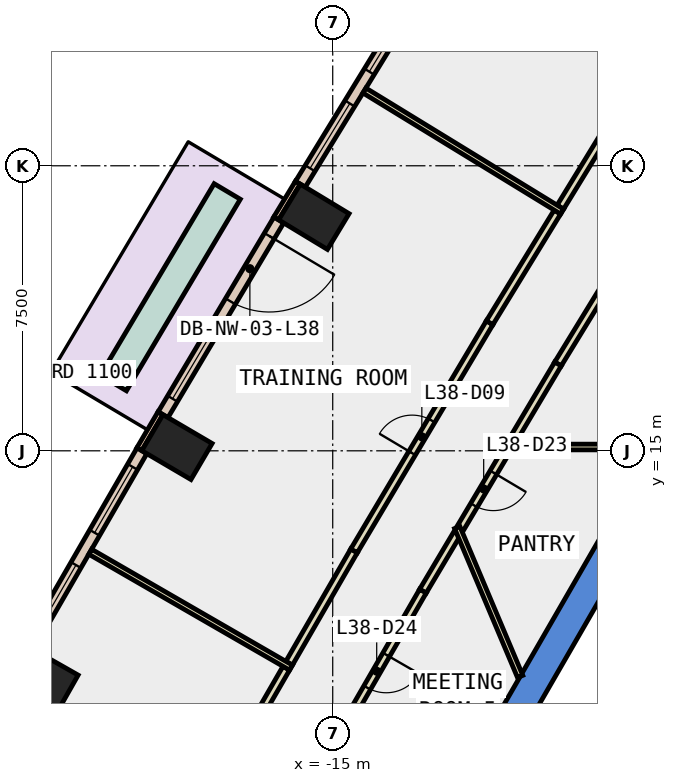
"""IFC4 building model, lengths in metres.
Left out: names, types, materials, properties, quantities, classifications, styles, units other than length and angle.
Written with IfcOpenShell. Run it as: python <this file> out.ifc"""

import sys

from ifc_helpers import new_model, si_unit, direction, frame, frame_2d, origin, origin_2d, place, context, subcontext, project, spatial, polyline, rectangle, outline, extrude, element, fill, save


model = new_model("IFC4")
c1 = context("Model", 3, precision=1e-05, world=origin(), true_north=direction((0.0, 1.0)))
c2 = subcontext(c1, "Body", "Model", "MODEL_VIEW")
j1 = project(units=[si_unit("LENGTHUNIT", "METRE"), si_unit("PLANEANGLEUNIT", "RADIAN")], contexts=[c1])
p1 = place(None, origin())
s1 = spatial("IfcSite", under=j1, at=p1, CompositionType="ELEMENT")
p2 = place(p1, origin())
s2 = spatial("IfcBuilding", under=s1, at=p2, CompositionType="ELEMENT")
p3 = place(p2, frame((0.0, 0.0, 171.8)))
s3 = spatial("IfcBuildingStorey", under=s2, at=p3, CompositionType="ELEMENT", Elevation=171.8)
for number, where, z_axis, x_axis in (
    (1, (-15.496, 21.158, -0.4), (0.0, 0.0, 1.0), (0.518, 0.855, 0.0)),
    (2, (-19.099, 15.098, -0.4), (0.0, 0.0, 1.0), (0.506, 0.863, 0.0)),
    (3, (-22.623, 8.991, -0.4), (0.0, 0.0, 1.0), (0.494, 0.869, 0.0)),
):
    element("IfcColumn", number, at=place(p3, frame(where, z_axis=z_axis, x_axis=x_axis)), inside=s3, PredefinedType="COLUMN", context=c2, shape_type="SweptSolid", body=[
        extrude(rectangle(XDim=1.1, YDim=1.5, at=origin_2d()), origin(), (0.0, 0.0, 1.0), 4.2),
    ])
p4 = place(p3, frame((0.0, 0.0, -0.4)))
e4 = element("IfcWall", 4, at=p4, inside=s3, PredefinedType="SHEAR", context=c2, shape_type="SweptSolid", body=[
    extrude(outline(polyline([(-12.267, 5.252), (-11.575, 4.852), (-6.466, 13.7), (-6.928, 14.5), (-12.267, 5.252)])), origin(), (0.0, 0.0, 1.0), 4.2),
])
p5 = place(p3, frame((-15.917, 22.056, 0.0), z_axis=(0.0, 0.0, 1.0), x_axis=(-0.518178754102, -0.855272341888, 0.0)))
e5 = element("IfcWall", 5, at=p5, inside=s3, PredefinedType="STANDARD", context=c2, shape_type="SweptSolid", body=[
    extrude(rectangle(XDim=1.1, YDim=0.15, at=frame_2d((0.55, 0.0))), origin(), (0.0, 0.0, 1.0), 3.8),
])
p6 = place(p3, frame((-19.532, 15.989, 0.0), z_axis=(0.0, 0.0, 1.0), x_axis=(-0.50667077411, -0.862139621327, 0.0)))
e6 = element("IfcWall", 6, at=p6, inside=s3, PredefinedType="STANDARD", context=c2, shape_type="SweptSolid", body=[
    extrude(rectangle(XDim=1.1, YDim=0.15, at=frame_2d((0.55, 0.0))), origin(), (0.0, 0.0, 1.0), 3.8),
])
p7 = place(p3, frame((-12.737, 27.101, 0.0), z_axis=(0.0, 0.0, 1.0), x_axis=(-0.522156898008, -0.852849443842, 0.0)))
e7 = element("IfcWall", 7, at=p7, inside=s3, PredefinedType="STANDARD", context=c2, shape_type="SweptSolid", body=[
    extrude(rectangle(XDim=5.964, YDim=0.3, at=frame_2d((2.982, 0.0))), origin(), (0.0, 0.0, 1.0), 3.8),
])
p8 = place(p7, frame((0.491, 0.0, 0.9)))
e8 = element("IfcOpeningElement", 8, at=p8, cuts=e7, PredefinedType="OPENING", context=c2, shape_type="SweptSolid", body=[
    extrude(rectangle(XDim=2.0, YDim=2.6, at=frame_2d((1.0, 1.3))), frame((0.0, 0.16, 0.0), z_axis=(0.0, -1.0, 0.0), x_axis=(1.0, 0.0, 0.0)), (0.0, 0.0, 1.0), 0.32),
])
p9 = place(p7, frame((3.473, 0.0, 0.9)))
e9 = element("IfcOpeningElement", 9, at=p9, cuts=e7, PredefinedType="OPENING", context=c2, shape_type="SweptSolid", body=[
    extrude(rectangle(XDim=2.0, YDim=2.6, at=frame_2d((1.0, 1.3))), frame((0.0, 0.16, 0.0), z_axis=(0.0, -1.0, 0.0), x_axis=(1.0, 0.0, 0.0)), (0.0, 0.0, 1.0), 0.32),
])
p10 = place(p3, frame((-16.418, 21.074, 0.0), z_axis=(0.0, 0.0, 1.0), x_axis=(-0.511053317394, -0.8595490136, 0.0)))
e10 = element("IfcWall", 10, at=p10, inside=s3, PredefinedType="STANDARD", context=c2, shape_type="SweptSolid", body=[
    extrude(rectangle(XDim=5.962, YDim=0.3, at=frame_2d((2.981, 0.0))), origin(), (0.0, 0.0, 1.0), 3.8),
])
p11 = place(p10, frame((0.491, 0.0, 0.0)))
e11 = element("IfcOpeningElement", 11, at=p11, cuts=e10, PredefinedType="OPENING", context=c2, shape_type="SweptSolid", body=[
    extrude(rectangle(XDim=2.0, YDim=2.4, at=frame_2d((1.0, 1.2))), frame((0.0, 0.16, 0.0), z_axis=(0.0, -1.0, 0.0), x_axis=(1.0, 0.0, 0.0)), (0.0, 0.0, 1.0), 0.32),
])
p12 = place(p10, frame((3.472, 0.0, 0.9)))
e12 = element("IfcOpeningElement", 12, at=p12, cuts=e10, PredefinedType="OPENING", context=c2, shape_type="SweptSolid", body=[
    extrude(rectangle(XDim=2.0, YDim=2.6, at=frame_2d((1.0, 1.3))), frame((0.0, 0.16, 0.0), z_axis=(0.0, -1.0, 0.0), x_axis=(1.0, 0.0, 0.0)), (0.0, 0.0, 1.0), 0.32),
])
p13 = place(p3, frame((-20.02, 15.002, 0.0), z_axis=(0.0, 0.0, 1.0), x_axis=(-0.49986421087, -0.866103787482, 0.0)))
e13 = element("IfcWall", 13, at=p13, inside=s3, PredefinedType="STANDARD", context=c2, shape_type="SweptSolid", body=[
    extrude(rectangle(XDim=5.964, YDim=0.3, at=frame_2d((2.982, 0.0))), origin(), (0.0, 0.0, 1.0), 3.8),
])
p14 = place(p13, frame((0.491, 0.0, 0.9)))
e14 = element("IfcOpeningElement", 14, at=p14, cuts=e13, PredefinedType="OPENING", context=c2, shape_type="SweptSolid", body=[
    extrude(rectangle(XDim=2.0, YDim=2.6, at=frame_2d((1.0, 1.3))), frame((0.0, 0.16, 0.0), z_axis=(0.0, -1.0, 0.0), x_axis=(1.0, 0.0, 0.0)), (0.0, 0.0, 1.0), 0.32),
])
p15 = place(p13, frame((3.473, 0.0, 0.9)))
e15 = element("IfcOpeningElement", 15, at=p15, cuts=e13, PredefinedType="OPENING", context=c2, shape_type="SweptSolid", body=[
    extrude(rectangle(XDim=2.0, YDim=2.6, at=frame_2d((1.0, 1.3))), frame((0.0, 0.16, 0.0), z_axis=(0.0, -1.0, 0.0), x_axis=(1.0, 0.0, 0.0)), (0.0, 0.0, 1.0), 0.32),
])
p16 = place(p3, frame((-17.776, 21.824, 0.0), z_axis=(0.0, 0.0, 1.0), x_axis=(-0.510988922218, -0.85958729712, 0.0)))
e16 = element("IfcWall", 16, at=p16, inside=s3, PredefinedType="STANDARD", context=c2, shape_type="SweptSolid", body=[
    extrude(rectangle(XDim=5.863, YDim=0.8, at=frame_2d((2.932, 0.0))), origin(), (0.0, 0.0, 1.0), 0.8),
])
p17 = place(p3, frame((-10.41, 15.036, 0.0), z_axis=(0.0, 0.0, 1.0), x_axis=(-0.510900085603, -0.859640100583, 0.0)))
e17 = element("IfcWall", 17, at=p17, inside=s3, PredefinedType="PARTITIONING", context=c2, shape_type="SweptSolid", body=[
    extrude(rectangle(XDim=2.419, YDim=0.2, at=frame_2d((1.21, 0.0))), origin(), (0.0, 0.0, 1.0), 3.8),
])
p18 = place(p17, frame((0.709, 0.0, 0.0)))
e18 = element("IfcOpeningElement", 18, at=p18, cuts=e17, PredefinedType="OPENING", context=c2, shape_type="SweptSolid", body=[
    extrude(rectangle(XDim=1.0, YDim=2.1, at=frame_2d((0.5, 1.05))), frame((0.0, 0.11, 0.0), z_axis=(0.0, -1.0, 0.0), x_axis=(1.0, 0.0, 0.0)), (0.0, 0.0, 1.0), 0.22),
])
p19 = place(p3, frame((-11.723, 12.827, 0.0), z_axis=(0.0, 0.0, 1.0), x_axis=(-0.511182890129, -0.859471961637, 0.0)))
e19 = element("IfcWall", 19, at=p19, inside=s3, PredefinedType="PARTITIONING", context=c2, shape_type="SweptSolid", body=[
    extrude(rectangle(XDim=1.769, YDim=0.2, at=frame_2d((0.884, 0.0))), origin(), (0.0, 0.0, 1.0), 3.8),
])
p20 = place(p3, frame((-12.627, 11.307, 0.0), z_axis=(0.0, 0.0, 1.0), x_axis=(-0.499907870494, -0.866078588246, 0.0)))
e20 = element("IfcWall", 20, at=p20, inside=s3, PredefinedType="PARTITIONING", context=c2, shape_type="SweptSolid", body=[
    extrude(rectangle(XDim=4.863, YDim=0.2, at=frame_2d((2.432, 0.0))), origin(), (0.0, 0.0, 1.0), 3.8),
])
p21 = place(p20, frame((1.932, 0.0, 0.0)))
e21 = element("IfcOpeningElement", 21, at=p21, cuts=e20, PredefinedType="OPENING", context=c2, shape_type="SweptSolid", body=[
    extrude(rectangle(XDim=1.0, YDim=2.1, at=frame_2d((0.5, 1.05))), frame((0.0, 0.11, 0.0), z_axis=(0.0, -1.0, 0.0), x_axis=(1.0, 0.0, 0.0)), (0.0, 0.0, 1.0), 0.22),
])
p22 = place(p3, frame((-5.441, 23.218, 0.0), z_axis=(0.0, 0.0, 1.0), x_axis=(-0.522108536257, -0.85287905143, 0.0)))
e22 = element("IfcWall", 22, at=p22, inside=s3, PredefinedType="PARTITIONING", context=c2, shape_type="SweptSolid", body=[
    extrude(rectangle(XDim=6.957, YDim=0.2, at=frame_2d((3.478, 0.0))), origin(), (0.0, 0.0, 1.0), 3.8),
])
p23 = place(p3, frame((-9.073, 17.285, 0.0), z_axis=(0.0, 0.0, 1.0), x_axis=(-0.51105761127, -0.859546460619, 0.0)))
e23 = element("IfcWall", 23, at=p23, inside=s3, PredefinedType="PARTITIONING", context=c2, shape_type="SweptSolid", body=[
    extrude(rectangle(XDim=2.467, YDim=0.2, at=frame_2d((1.234, 0.0))), origin(), (0.0, 0.0, 1.0), 3.8),
])
p24 = place(p3, frame((-9.01, 21.411, 0.0), z_axis=(0.0, 0.0, 1.0), x_axis=(0.52198736623, 0.852953216476, 0.0)))
e24 = element("IfcWall", 24, at=p24, inside=s3, PredefinedType="PARTITIONING", context=c2, shape_type="SweptSolid", body=[
    extrude(rectangle(XDim=3.417, YDim=0.2, at=frame_2d((1.709, 0.0))), origin(), (0.0, 0.0, 1.0), 3.8),
])
p25 = place(p3, frame((-16.147, 9.41, 0.0), z_axis=(0.0, 0.0, 1.0), x_axis=(0.500044178772, 0.865999895656, 0.0)))
e25 = element("IfcWall", 25, at=p25, inside=s3, PredefinedType="PARTITIONING", context=c2, shape_type="SweptSolid", body=[
    extrude(rectangle(XDim=3.416, YDim=0.2, at=frame_2d((1.708, 0.0))), origin(), (0.0, 0.0, 1.0), 3.8),
])
p26 = place(p3, frame((-14.439, 12.368, 0.0), z_axis=(0.0, 0.0, 1.0), x_axis=(0.51096926939, 0.859598979606, 0.0)))
e26 = element("IfcWall", 26, at=p26, inside=s3, PredefinedType="PARTITIONING", context=c2, shape_type="SweptSolid", body=[
    extrude(rectangle(XDim=6.983, YDim=0.2, at=frame_2d((3.491, 0.0))), origin(), (0.0, 0.0, 1.0), 3.8),
])
p27 = place(p26, frame((2.991, 0.0, 0.0)))
e27 = element("IfcOpeningElement", 27, at=p27, cuts=e26, PredefinedType="OPENING", context=c2, shape_type="SweptSolid", body=[
    extrude(rectangle(XDim=1.0, YDim=2.1, at=frame_2d((0.5, 1.05))), frame((0.0, 0.11, 0.0), z_axis=(0.0, -1.0, 0.0), x_axis=(1.0, 0.0, 0.0)), (0.0, 0.0, 1.0), 0.22),
])
p28 = place(p3, frame((-10.871, 18.37, 0.0), z_axis=(0.0, 0.0, 1.0), x_axis=(0.522117781608, 0.852873391617, 0.0)))
e28 = element("IfcWall", 28, at=p28, inside=s3, PredefinedType="PARTITIONING", context=c2, shape_type="SweptSolid", body=[
    extrude(rectangle(XDim=3.415, YDim=0.2, at=frame_2d((1.708, 0.0))), origin(), (0.0, 0.0, 1.0), 3.8),
])
p29 = place(p3, frame((-17.93, 6.321, 0.0), z_axis=(0.0, 0.0, 1.0), x_axis=(0.499920397431, 0.866071357471, 0.0)))
e29 = element("IfcWall", 29, at=p29, inside=s3, PredefinedType="PARTITIONING", context=c2, shape_type="SweptSolid", body=[
    extrude(rectangle(XDim=3.417, YDim=0.2, at=frame_2d((1.708, 0.0))), origin(), (0.0, 0.0, 1.0), 3.8),
])
p30 = place(p3, frame((-10.068, 9.062, 0.0), z_axis=(0.0, 0.0, 1.0), x_axis=(-0.388992587102, 0.921240884448, 0.0)))
e30 = element("IfcWall", 30, at=p30, inside=s3, PredefinedType="PARTITIONING", context=c2, shape_type="SweptSolid", body=[
    extrude(rectangle(XDim=4.257, YDim=0.15, at=frame_2d((2.128, 0.0))), origin(), (0.0, 0.0, 1.0), 3.8),
])
p31 = place(p3, frame((-6.82, 15.1, 0.0), z_axis=(0.0, 0.0, 1.0), x_axis=(-1.0, 0.0, 0.0)))
e31 = element("IfcWall", 31, at=p31, inside=s3, PredefinedType="PARTITIONING", context=c2, shape_type="SweptSolid", body=[
    extrude(rectangle(XDim=3.652, YDim=0.15, at=frame_2d((1.826, 0.0))), origin(), (0.0, 0.0, 1.0), 3.8),
])
p32 = place(p3, frame((-8.964, 21.295, 0.0), z_axis=(0.0, 0.0, 1.0), x_axis=(-0.852835298101, 0.522180001832, 0.0)))
e32 = element("IfcWall", 32, at=p32, inside=s3, PredefinedType="PARTITIONING", context=c2, shape_type="SweptSolid", body=[
    extrude(rectangle(XDim=6.1, YDim=0.15, at=frame_2d((3.05, 0.0))), origin(), (0.0, 0.0, 1.0), 3.8),
])
p33 = place(p3, frame((-16.098, 9.295, 0.0), z_axis=(0.0, 0.0, 1.0), x_axis=(-0.866109615698, 0.499854112313, 0.0)))
e33 = element("IfcWall", 33, at=p33, inside=s3, PredefinedType="PARTITIONING", context=c2, shape_type="SweptSolid", body=[
    extrude(rectangle(XDim=6.1, YDim=0.15, at=frame_2d((3.05, 0.0))), origin(), (0.0, 0.0, 1.0), 3.8),
])
p34 = place(p3, frame((-5.03, 9.388, 0.0), z_axis=(0.0, 0.0, 1.0), x_axis=(-0.499978703459, -0.866037698999, 0.0)))
e34 = element("IfcWall", 34, at=p34, inside=s3, PredefinedType="STANDARD", context=c2, shape_type="SweptSolid", body=[
    extrude(rectangle(XDim=6.9, YDim=0.2, at=frame_2d((3.45, 0.0))), origin(), (0.0, 0.0, 1.0), 3.8),
])
p35 = place(p8, origin())
e35 = element("IfcWindow", 35, at=p35, inside=s3, PartitioningType="SINGLE_PANEL", PredefinedType="WINDOW", context=c2, shape_type="SweptSolid", body=[
    extrude(rectangle(XDim=2.0, YDim=2.6, at=frame_2d((1.0, 1.3))), frame((0.0, 0.03, 0.0), z_axis=(0.0, -1.0, 0.0), x_axis=(1.0, 0.0, 0.0)), (0.0, 0.0, 1.0), 0.06),
])
fill(e8, e35)
p36 = place(p9, origin())
e36 = element("IfcWindow", 36, at=p36, inside=s3, PartitioningType="SINGLE_PANEL", PredefinedType="WINDOW", context=c2, shape_type="SweptSolid", body=[
    extrude(rectangle(XDim=2.0, YDim=2.6, at=frame_2d((1.0, 1.3))), frame((0.0, 0.03, 0.0), z_axis=(0.0, -1.0, 0.0), x_axis=(1.0, 0.0, 0.0)), (0.0, 0.0, 1.0), 0.06),
])
fill(e9, e36)
p37 = place(p11, origin())
e37 = element("IfcDoor", 37, at=p37, inside=s3, OperationType="SLIDING_TO_LEFT", PredefinedType="DOOR", context=c2, shape_type="SweptSolid", body=[
    extrude(rectangle(XDim=2.0, YDim=2.4, at=frame_2d((1.0, 1.2))), frame((0.0, 0.025, 0.0), z_axis=(0.0, -1.0, 0.0), x_axis=(1.0, 0.0, 0.0)), (0.0, 0.0, 1.0), 0.05),
])
fill(e11, e37)
p38 = place(p12, origin())
e38 = element("IfcWindow", 38, at=p38, inside=s3, PartitioningType="SINGLE_PANEL", PredefinedType="WINDOW", context=c2, shape_type="SweptSolid", body=[
    extrude(rectangle(XDim=2.0, YDim=2.6, at=frame_2d((1.0, 1.3))), frame((0.0, 0.03, 0.0), z_axis=(0.0, -1.0, 0.0), x_axis=(1.0, 0.0, 0.0)), (0.0, 0.0, 1.0), 0.06),
])
fill(e12, e38)
p39 = place(p14, origin())
e39 = element("IfcWindow", 39, at=p39, inside=s3, PartitioningType="SINGLE_PANEL", PredefinedType="WINDOW", context=c2, shape_type="SweptSolid", body=[
    extrude(rectangle(XDim=2.0, YDim=2.6, at=frame_2d((1.0, 1.3))), frame((0.0, 0.03, 0.0), z_axis=(0.0, -1.0, 0.0), x_axis=(1.0, 0.0, 0.0)), (0.0, 0.0, 1.0), 0.06),
])
fill(e14, e39)
p40 = place(p15, origin())
e40 = element("IfcWindow", 40, at=p40, inside=s3, PartitioningType="SINGLE_PANEL", PredefinedType="WINDOW", context=c2, shape_type="SweptSolid", body=[
    extrude(rectangle(XDim=2.0, YDim=2.6, at=frame_2d((1.0, 1.3))), frame((0.0, 0.03, 0.0), z_axis=(0.0, -1.0, 0.0), x_axis=(1.0, 0.0, 0.0)), (0.0, 0.0, 1.0), 0.06),
])
fill(e15, e40)
p41 = place(p27, origin())
e41 = element("IfcDoor", 41, at=p41, inside=s3, OperationType="SINGLE_SWING_LEFT", PredefinedType="DOOR", context=c2, shape_type="SweptSolid", body=[
    extrude(rectangle(XDim=1.0, YDim=2.1, at=frame_2d((0.5, 1.05))), frame((0.0, 0.025, 0.0), z_axis=(0.0, -1.0, 0.0), x_axis=(1.0, 0.0, 0.0)), (0.0, 0.0, 1.0), 0.05),
])
fill(e27, e41)
p42 = place(p18, origin())
e42 = element("IfcDoor", 42, at=p42, inside=s3, OperationType="SINGLE_SWING_LEFT", PredefinedType="DOOR", context=c2, shape_type="SweptSolid", body=[
    extrude(rectangle(XDim=1.0, YDim=2.1, at=frame_2d((0.5, 1.05))), frame((0.0, 0.025, 0.0), z_axis=(0.0, -1.0, 0.0), x_axis=(1.0, 0.0, 0.0)), (0.0, 0.0, 1.0), 0.05),
])
fill(e18, e42)
p43 = place(p21, origin())
e43 = element("IfcDoor", 43, at=p43, inside=s3, OperationType="SINGLE_SWING_LEFT", PredefinedType="DOOR", context=c2, shape_type="SweptSolid", body=[
    extrude(rectangle(XDim=1.0, YDim=2.1, at=frame_2d((0.5, 1.05))), frame((0.0, 0.025, 0.0), z_axis=(0.0, -1.0, 0.0), x_axis=(1.0, 0.0, 0.0)), (0.0, 0.0, 1.0), 0.05),
])
fill(e21, e43)
save(model, sys.argv[1])
